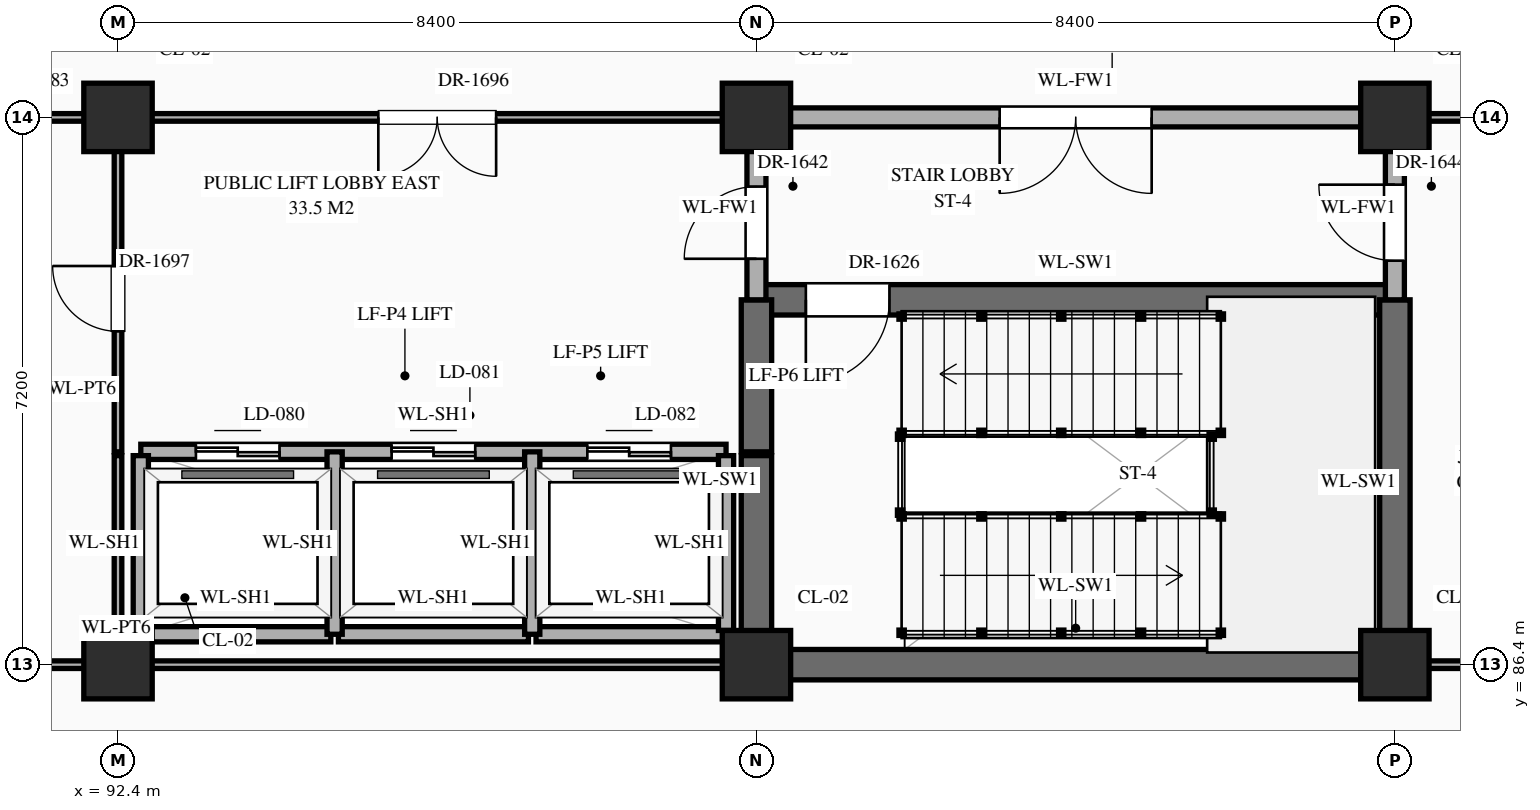
"""IFC4 building model, lengths in metres.
Left out: names, types, materials, properties, quantities, classifications, styles, units other than length and angle.
Written with IfcOpenShell. Run it as: python <this file> out.ifc"""

import sys

from ifc_helpers import new_model, si_unit, direction, frame, frame_2d, origin, origin_2d, place, context, subcontext, project, spatial, rectangle, extrude, element, fill, save


model = new_model("IFC4")
c1 = context("Model", 3, precision=1e-05, world=origin(), true_north=direction((0.0, 1.0)))
c2 = subcontext(c1, "Body", "Model", "MODEL_VIEW")
j1 = project(units=[si_unit("LENGTHUNIT", "METRE"), si_unit("PLANEANGLEUNIT", "RADIAN")], contexts=[c1])
p1 = place(None, origin())
s1 = spatial("IfcSite", under=j1, at=p1, CompositionType="ELEMENT")
p2 = place(p1, origin())
s2 = spatial("IfcBuilding", under=s1, at=p2, CompositionType="ELEMENT")
p3 = place(p2, frame((0.0, 0.0, 16.2)))
s3 = spatial("IfcBuildingStorey", under=s2, at=p3, CompositionType="ELEMENT", Elevation=16.2)
for number, where, z_axis, x_axis in (
    (1, (92.4, 86.4, 0.0), (0.0, 0.0, 1.0), (1.0, 0.0, 0.0)),
    (2, (92.4, 93.6, 0.0), (0.0, 0.0, 1.0), (1.0, 0.0, 0.0)),
    (3, (100.8, 86.4, 0.0), (0.0, 0.0, 1.0), (1.0, 0.0, 0.0)),
    (4, (100.8, 93.6, 0.0), (0.0, 0.0, 1.0), (1.0, 0.0, 0.0)),
    (5, (109.2, 86.4, 0.0), (0.0, 0.0, 1.0), (1.0, 0.0, 0.0)),
    (6, (109.2, 93.6, 0.0), (0.0, 0.0, 1.0), (1.0, 0.0, 0.0)),
):
    element("IfcColumn", number, at=place(p3, frame(where, z_axis=z_axis, x_axis=x_axis)), inside=s3, PredefinedType="COLUMN", context=c2, shape_type="SweptSolid", body=[
        extrude(rectangle(XDim=0.9, YDim=0.9, at=origin_2d()), origin(), (0.0, 0.0, 1.0), 5.4),
    ])
p4 = place(p3, frame((84.0, 86.4, 0.0), z_axis=(0.0, 0.0, 1.0), x_axis=(1.0, 0.0, 0.0)))
e7 = element("IfcWall", 7, at=p4, inside=s3, PredefinedType="STANDARD", context=c2, shape_type="SweptSolid", body=[
    extrude(rectangle(XDim=8.4, YDim=0.1, at=frame_2d((4.2, 0.0))), origin(), (0.0, 0.0, 1.0), 4.27),
])
p5 = place(p4, frame((1.065, 0.0, 0.0)))
e8 = element("IfcOpeningElement", 8, at=p5, cuts=e7, PredefinedType="OPENING", context=c2, shape_type="SweptSolid", body=[
    extrude(rectangle(XDim=1.04, YDim=2.2, at=frame_2d((0.52, 1.1))), frame((0.0, 0.062, 0.0), z_axis=(0.0, -1.0, 0.0), x_axis=(1.0, 0.0, 0.0)), (0.0, 0.0, 1.0), 0.124),
])
p6 = place(p4, frame((3.64, 0.0, 0.0)))
e9 = element("IfcOpeningElement", 9, at=p6, cuts=e7, PredefinedType="OPENING", context=c2, shape_type="SweptSolid", body=[
    extrude(rectangle(XDim=1.12, YDim=2.25, at=frame_2d((0.56, 1.125))), frame((0.0, 0.062, 0.0), z_axis=(0.0, -1.0, 0.0), x_axis=(1.0, 0.0, 0.0)), (0.0, 0.0, 1.0), 0.124),
])
p7 = place(p4, frame((6.235, 0.0, 0.0)))
e10 = element("IfcOpeningElement", 10, at=p7, cuts=e7, PredefinedType="OPENING", context=c2, shape_type="SweptSolid", body=[
    extrude(rectangle(XDim=1.16, YDim=2.3, at=frame_2d((0.58, 1.15))), frame((0.0, 0.062, 0.0), z_axis=(0.0, -1.0, 0.0), x_axis=(1.0, 0.0, 0.0)), (0.0, 0.0, 1.0), 0.124),
])
p8 = place(p3, frame((92.45, 86.4, 0.0), z_axis=(0.0, 0.0, 1.0), x_axis=(1.0, 0.0, 0.0)))
e11 = element("IfcWall", 11, at=p8, inside=s3, PredefinedType="STANDARD", context=c2, shape_type="SweptSolid", body=[
    extrude(rectangle(XDim=8.3, YDim=0.1, at=frame_2d((4.15, 0.0))), origin(), (0.0, 0.0, 1.0), 4.27),
])
p9 = place(p3, frame((100.8, 86.4, 0.0), z_axis=(0.0, 0.0, 1.0), x_axis=(1.0, 0.0, 0.0)))
e12 = element("IfcWall", 12, at=p9, inside=s3, PredefinedType="SHEAR", context=c2, shape_type="SweptSolid", body=[
    extrude(rectangle(XDim=8.4, YDim=0.4, at=frame_2d((4.2, 0.0))), origin(), (0.0, 0.0, 1.0), 5.12),
])
p10 = place(p3, frame((109.2, 86.4, 0.0), z_axis=(0.0, 0.0, 1.0), x_axis=(1.0, 0.0, 0.0)))
e13 = element("IfcWall", 13, at=p10, inside=s3, PredefinedType="STANDARD", context=c2, shape_type="SweptSolid", body=[
    extrude(rectangle(XDim=8.4, YDim=0.1, at=frame_2d((4.2, 0.0))), origin(), (0.0, 0.0, 1.0), 4.27),
])
p11 = place(p10, frame((0.965, 0.0, 0.0)))
e14 = element("IfcOpeningElement", 14, at=p11, cuts=e13, PredefinedType="OPENING", context=c2, shape_type="SweptSolid", body=[
    extrude(rectangle(XDim=1.24, YDim=2.3, at=frame_2d((0.62, 1.15))), frame((0.0, 0.062, 0.0), z_axis=(0.0, -1.0, 0.0), x_axis=(1.0, 0.0, 0.0)), (0.0, 0.0, 1.0), 0.124),
])
p12 = place(p10, frame((3.73, 0.0, 0.0)))
e15 = element("IfcOpeningElement", 15, at=p12, cuts=e13, PredefinedType="OPENING", context=c2, shape_type="SweptSolid", body=[
    extrude(rectangle(XDim=0.94, YDim=2.3, at=frame_2d((0.47, 1.15))), frame((0.0, 0.062, 0.0), z_axis=(0.0, -1.0, 0.0), x_axis=(1.0, 0.0, 0.0)), (0.0, 0.0, 1.0), 0.124),
])
p13 = place(p10, frame((6.325, 0.0, 0.0)))
e16 = element("IfcOpeningElement", 16, at=p13, cuts=e13, PredefinedType="OPENING", context=c2, shape_type="SweptSolid", body=[
    extrude(rectangle(XDim=0.98, YDim=2.35, at=frame_2d((0.49, 1.175))), frame((0.0, 0.062, 0.0), z_axis=(0.0, -1.0, 0.0), x_axis=(1.0, 0.0, 0.0)), (0.0, 0.0, 1.0), 0.124),
])
for number, where, z_axis, x_axis in (
    (17, (92.7, 86.8, 0.0), (0.0, 0.0, 1.0), (1.0, 0.0, 0.0)),
    (18, (95.3, 86.8, 0.0), (0.0, 0.0, 1.0), (1.0, 0.0, 0.0)),
    (19, (97.9, 86.8, 0.0), (0.0, 0.0, 1.0), (1.0, 0.0, 0.0)),
):
    element("IfcWall", number, at=place(p3, frame(where, z_axis=z_axis, x_axis=x_axis)), inside=s3, PredefinedType="STANDARD", context=c2, shape_type="SweptSolid", body=[
        extrude(rectangle(XDim=2.5, YDim=0.2, at=frame_2d((1.25, 0.0))), origin(), (0.0, 0.0, 1.0), 5.12),
    ])
p14 = place(p3, frame((92.7, 89.2, 0.0), z_axis=(0.0, 0.0, 1.0), x_axis=(1.0, 0.0, 0.0)))
e20 = element("IfcWall", 20, at=p14, inside=s3, PredefinedType="STANDARD", context=c2, shape_type="SweptSolid", body=[
    extrude(rectangle(XDim=7.7, YDim=0.2, at=frame_2d((3.85, 0.0))), origin(), (0.0, 0.0, 1.0), 5.12),
])
p15 = place(p14, frame((0.725, 0.0, 0.0)))
e21 = element("IfcOpeningElement", 21, at=p15, cuts=e20, PredefinedType="OPENING", context=c2, shape_type="SweptSolid", body=[
    extrude(rectangle(XDim=1.1, YDim=2.15, at=frame_2d((0.55, 1.075))), frame((0.0, 0.112, 0.0), z_axis=(0.0, -1.0, 0.0), x_axis=(1.0, 0.0, 0.0)), (0.0, 0.0, 1.0), 0.224),
])
p16 = place(p14, frame((3.3, 0.0, 0.0)))
e22 = element("IfcOpeningElement", 22, at=p16, cuts=e20, PredefinedType="OPENING", context=c2, shape_type="SweptSolid", body=[
    extrude(rectangle(XDim=1.1, YDim=2.15, at=frame_2d((0.55, 1.075))), frame((0.0, 0.112, 0.0), z_axis=(0.0, -1.0, 0.0), x_axis=(1.0, 0.0, 0.0)), (0.0, 0.0, 1.0), 0.224),
])
p17 = place(p14, frame((5.875, 0.0, 0.0)))
e23 = element("IfcOpeningElement", 23, at=p17, cuts=e20, PredefinedType="OPENING", context=c2, shape_type="SweptSolid", body=[
    extrude(rectangle(XDim=1.1, YDim=2.15, at=frame_2d((0.55, 1.075))), frame((0.0, 0.112, 0.0), z_axis=(0.0, -1.0, 0.0), x_axis=(1.0, 0.0, 0.0)), (0.0, 0.0, 1.0), 0.224),
])
p18 = place(p3, frame((100.8, 91.2, 0.0), z_axis=(0.0, 0.0, 1.0), x_axis=(1.0, 0.0, 0.0)))
e24 = element("IfcWall", 24, at=p18, inside=s3, PredefinedType="SHEAR", context=c2, shape_type="SweptSolid", body=[
    extrude(rectangle(XDim=8.4, YDim=0.4, at=frame_2d((4.2, 0.0))), origin(), (0.0, 0.0, 1.0), 5.12),
])
p19 = place(p18, frame((0.65, 0.0, 0.0)))
e25 = element("IfcOpeningElement", 25, at=p19, cuts=e24, PredefinedType="OPENING", context=c2, shape_type="SweptSolid", body=[
    extrude(rectangle(XDim=1.1, YDim=2.2, at=frame_2d((0.55, 1.1))), frame((0.0, 0.212, 0.0), z_axis=(0.0, -1.0, 0.0), x_axis=(1.0, 0.0, 0.0)), (0.0, 0.0, 1.0), 0.424),
])
p20 = place(p3, frame((67.2, 93.6, 0.0), z_axis=(0.0, 0.0, 1.0), x_axis=(1.0, 0.0, 0.0)))
e26 = element("IfcWall", 26, at=p20, inside=s3, PredefinedType="STANDARD", context=c2, shape_type="SweptSolid", body=[
    extrude(rectangle(XDim=33.6, YDim=0.1, at=frame_2d((16.8, 0.0))), origin(), (0.0, 0.0, 1.0), 4.27),
])
p21 = place(p20, frame((3.375, 0.0, 0.0)))
e27 = element("IfcOpeningElement", 27, at=p21, cuts=e26, PredefinedType="OPENING", context=c2, shape_type="SweptSolid", body=[
    extrude(rectangle(XDim=1.65, YDim=2.4, at=frame_2d((0.825, 1.2))), frame((0.0, 0.062, 0.0), z_axis=(0.0, -1.0, 0.0), x_axis=(1.0, 0.0, 0.0)), (0.0, 0.0, 1.0), 0.124),
])
p22 = place(p20, frame((28.625, 0.0, 0.0)))
e28 = element("IfcOpeningElement", 28, at=p22, cuts=e26, PredefinedType="OPENING", context=c2, shape_type="SweptSolid", body=[
    extrude(rectangle(XDim=1.55, YDim=2.35, at=frame_2d((0.775, 1.175))), frame((0.0, 0.062, 0.0), z_axis=(0.0, -1.0, 0.0), x_axis=(1.0, 0.0, 0.0)), (0.0, 0.0, 1.0), 0.124),
])
p23 = place(p20, frame((11.65, 0.0, 0.0)))
e29 = element("IfcOpeningElement", 29, at=p23, cuts=e26, PredefinedType="OPENING", context=c2, shape_type="SweptSolid", body=[
    extrude(rectangle(XDim=1.9, YDim=2.5, at=frame_2d((0.95, 1.25))), frame((0.0, 0.062, 0.0), z_axis=(0.0, -1.0, 0.0), x_axis=(1.0, 0.0, 0.0)), (0.0, 0.0, 1.0), 0.124),
])
p24 = place(p20, frame((17.935, 0.0, 0.0)))
e30 = element("IfcOpeningElement", 30, at=p24, cuts=e26, PredefinedType="OPENING", context=c2, shape_type="SweptSolid", body=[
    extrude(rectangle(XDim=0.9, YDim=2.15, at=frame_2d((0.45, 1.075))), frame((0.0, 0.062, 0.0), z_axis=(0.0, -1.0, 0.0), x_axis=(1.0, 0.0, 0.0)), (0.0, 0.0, 1.0), 0.124),
])
p25 = place(p20, frame((20.57, 0.0, 0.0)))
e31 = element("IfcOpeningElement", 31, at=p25, cuts=e26, PredefinedType="OPENING", context=c2, shape_type="SweptSolid", body=[
    extrude(rectangle(XDim=0.86, YDim=2.1, at=frame_2d((0.43, 1.05))), frame((0.0, 0.062, 0.0), z_axis=(0.0, -1.0, 0.0), x_axis=(1.0, 0.0, 0.0)), (0.0, 0.0, 1.0), 0.124),
])
p26 = place(p20, frame((23.155, 0.0, 0.0)))
e32 = element("IfcOpeningElement", 32, at=p26, cuts=e26, PredefinedType="OPENING", context=c2, shape_type="SweptSolid", body=[
    extrude(rectangle(XDim=0.92, YDim=2.15, at=frame_2d((0.46, 1.075))), frame((0.0, 0.062, 0.0), z_axis=(0.0, -1.0, 0.0), x_axis=(1.0, 0.0, 0.0)), (0.0, 0.0, 1.0), 0.124),
])
p27 = place(p3, frame((100.8, 93.6, 0.0), z_axis=(0.0, 0.0, 1.0), x_axis=(1.0, 0.0, 0.0)))
e33 = element("IfcWall", 33, at=p27, inside=s3, PredefinedType="STANDARD", context=c2, shape_type="SweptSolid", body=[
    extrude(rectangle(XDim=8.4, YDim=0.25, at=frame_2d((4.2, 0.0))), origin(), (0.0, 0.0, 1.0), 4.27),
])
p28 = place(p27, frame((3.2, 0.0, 0.0)))
e34 = element("IfcOpeningElement", 34, at=p28, cuts=e33, PredefinedType="OPENING", context=c2, shape_type="SweptSolid", body=[
    extrude(rectangle(XDim=2.0, YDim=2.4, at=frame_2d((1.0, 1.2))), frame((0.0, 0.137, 0.0), z_axis=(0.0, -1.0, 0.0), x_axis=(1.0, 0.0, 0.0)), (0.0, 0.0, 1.0), 0.274),
])
p29 = place(p3, frame((109.2, 93.6, 0.0), z_axis=(0.0, 0.0, 1.0), x_axis=(1.0, 0.0, 0.0)))
e35 = element("IfcWall", 35, at=p29, inside=s3, PredefinedType="STANDARD", context=c2, shape_type="SweptSolid", body=[
    extrude(rectangle(XDim=8.4, YDim=0.1, at=frame_2d((4.2, 0.0))), origin(), (0.0, 0.0, 1.0), 4.27),
])
p30 = place(p29, frame((1.105, 0.0, 0.0)))
e36 = element("IfcOpeningElement", 36, at=p30, cuts=e35, PredefinedType="OPENING", context=c2, shape_type="SweptSolid", body=[
    extrude(rectangle(XDim=0.96, YDim=2.2, at=frame_2d((0.48, 1.1))), frame((0.0, 0.062, 0.0), z_axis=(0.0, -1.0, 0.0), x_axis=(1.0, 0.0, 0.0)), (0.0, 0.0, 1.0), 0.124),
])
p31 = place(p29, frame((3.7, 0.0, 0.0)))
e37 = element("IfcOpeningElement", 37, at=p31, cuts=e35, PredefinedType="OPENING", context=c2, shape_type="SweptSolid", body=[
    extrude(rectangle(XDim=1.0, YDim=2.25, at=frame_2d((0.5, 1.125))), frame((0.0, 0.062, 0.0), z_axis=(0.0, -1.0, 0.0), x_axis=(1.0, 0.0, 0.0)), (0.0, 0.0, 1.0), 0.124),
])
p32 = place(p29, frame((6.295, 0.0, 0.0)))
e38 = element("IfcOpeningElement", 38, at=p32, cuts=e35, PredefinedType="OPENING", context=c2, shape_type="SweptSolid", body=[
    extrude(rectangle(XDim=1.04, YDim=2.2, at=frame_2d((0.52, 1.1))), frame((0.0, 0.062, 0.0), z_axis=(0.0, -1.0, 0.0), x_axis=(1.0, 0.0, 0.0)), (0.0, 0.0, 1.0), 0.124),
])
p33 = place(p3, frame((92.4, 86.45, 0.0), z_axis=(0.0, 0.0, 1.0), x_axis=(0.0, 1.0, 0.0)))
e39 = element("IfcWall", 39, at=p33, inside=s3, PredefinedType="STANDARD", context=c2, shape_type="SweptSolid", body=[
    extrude(rectangle(XDim=2.7, YDim=0.1, at=frame_2d((1.35, 0.0))), origin(), (0.0, 0.0, 1.0), 4.37),
])
p34 = place(p3, frame((92.4, 89.2, 0.0), z_axis=(0.0, 0.0, 1.0), x_axis=(0.0, 1.0, 0.0)))
e40 = element("IfcWall", 40, at=p34, inside=s3, PredefinedType="STANDARD", context=c2, shape_type="SweptSolid", body=[
    extrude(rectangle(XDim=4.4, YDim=0.1, at=frame_2d((2.2, 0.0))), origin(), (0.0, 0.0, 1.0), 4.37),
])
p35 = place(p34, frame((1.585, 0.0, 0.0)))
e41 = element("IfcOpeningElement", 41, at=p35, cuts=e40, PredefinedType="OPENING", context=c2, shape_type="SweptSolid", body=[
    extrude(rectangle(XDim=0.86, YDim=2.1, at=frame_2d((0.43, 1.05))), frame((0.0, 0.062, 0.0), z_axis=(0.0, -1.0, 0.0), x_axis=(1.0, 0.0, 0.0)), (0.0, 0.0, 1.0), 0.124),
])
p36 = place(p3, frame((92.7, 86.85, 0.0), z_axis=(0.0, 0.0, 1.0), x_axis=(0.0, 1.0, 0.0)))
e42 = element("IfcWall", 42, at=p36, inside=s3, PredefinedType="STANDARD", context=c2, shape_type="SweptSolid", body=[
    extrude(rectangle(XDim=2.3, YDim=0.2, at=frame_2d((1.15, 0.0))), origin(), (0.0, 0.0, 1.0), 5.12),
])
for number, where, z_axis, x_axis in (
    (43, (95.25, 86.8, 0.0), (0.0, 0.0, 1.0), (0.0, 1.0, 0.0)),
    (44, (97.85, 86.8, 0.0), (0.0, 0.0, 1.0), (0.0, 1.0, 0.0)),
):
    element("IfcWall", number, at=place(p3, frame(where, z_axis=z_axis, x_axis=x_axis)), inside=s3, PredefinedType="STANDARD", context=c2, shape_type="SweptSolid", body=[
        extrude(rectangle(XDim=2.4, YDim=0.2, at=frame_2d((1.2, 0.0))), origin(), (0.0, 0.0, 1.0), 5.12),
    ])
p37 = place(p3, frame((100.4, 86.85, 0.0), z_axis=(0.0, 0.0, 1.0), x_axis=(0.0, 1.0, 0.0)))
e45 = element("IfcWall", 45, at=p37, inside=s3, PredefinedType="STANDARD", context=c2, shape_type="SweptSolid", body=[
    extrude(rectangle(XDim=2.3, YDim=0.2, at=frame_2d((1.15, 0.0))), origin(), (0.0, 0.0, 1.0), 5.12),
])
p38 = place(p3, frame((100.8, 86.45, 0.0), z_axis=(0.0, 0.0, 1.0), x_axis=(0.0, 1.0, 0.0)))
e46 = element("IfcWall", 46, at=p38, inside=s3, PredefinedType="SHEAR", context=c2, shape_type="SweptSolid", body=[
    extrude(rectangle(XDim=2.7, YDim=0.4, at=frame_2d((1.35, 0.0))), origin(), (0.0, 0.0, 1.0), 5.12),
])
p39 = place(p3, frame((100.8, 89.2, 0.0), z_axis=(0.0, 0.0, 1.0), x_axis=(0.0, 1.0, 0.0)))
e47 = element("IfcWall", 47, at=p39, inside=s3, PredefinedType="SHEAR", context=c2, shape_type="SweptSolid", body=[
    extrude(rectangle(XDim=2.0, YDim=0.4, at=frame_2d((1.0, 0.0))), origin(), (0.0, 0.0, 1.0), 5.12),
])
p40 = place(p3, frame((100.8, 91.2, 0.0), z_axis=(0.0, 0.0, 1.0), x_axis=(0.0, 1.0, 0.0)))
e48 = element("IfcWall", 48, at=p40, inside=s3, PredefinedType="STANDARD", context=c2, shape_type="SweptSolid", body=[
    extrude(rectangle(XDim=2.4, YDim=0.25, at=frame_2d((1.2, 0.0))), origin(), (0.0, 0.0, 1.0), 4.37),
])
p41 = place(p40, frame((0.54, 0.0, 0.0)))
e49 = element("IfcOpeningElement", 49, at=p41, cuts=e48, PredefinedType="OPENING", context=c2, shape_type="SweptSolid", body=[
    extrude(rectangle(XDim=0.95, YDim=2.15, at=frame_2d((0.475, 1.075))), frame((0.0, 0.137, 0.0), z_axis=(0.0, -1.0, 0.0), x_axis=(1.0, 0.0, 0.0)), (0.0, 0.0, 1.0), 0.274),
])
p42 = place(p3, frame((109.2, 86.4, 0.0), z_axis=(0.0, 0.0, 1.0), x_axis=(0.0, 1.0, 0.0)))
e50 = element("IfcWall", 50, at=p42, inside=s3, PredefinedType="SHEAR", context=c2, shape_type="SweptSolid", body=[
    extrude(rectangle(XDim=4.8, YDim=0.4, at=frame_2d((2.4, 0.0))), origin(), (0.0, 0.0, 1.0), 5.12),
])
p43 = place(p3, frame((109.2, 91.2, 0.0), z_axis=(0.0, 0.0, 1.0), x_axis=(0.0, 1.0, 0.0)))
e51 = element("IfcWall", 51, at=p43, inside=s3, PredefinedType="STANDARD", context=c2, shape_type="SweptSolid", body=[
    extrude(rectangle(XDim=2.4, YDim=0.25, at=frame_2d((1.2, 0.0))), origin(), (0.0, 0.0, 1.0), 4.37),
])
p44 = place(p43, frame((0.515, 0.0, 0.0)))
e52 = element("IfcOpeningElement", 52, at=p44, cuts=e51, PredefinedType="OPENING", context=c2, shape_type="SweptSolid", body=[
    extrude(rectangle(XDim=1.0, YDim=2.2, at=frame_2d((0.5, 1.1))), frame((0.0, 0.137, 0.0), z_axis=(0.0, -1.0, 0.0), x_axis=(1.0, 0.0, 0.0)), (0.0, 0.0, 1.0), 0.274),
])
p45 = place(p15, origin())
e53 = element("IfcDoor", 53, at=p45, inside=s3, OperationType="DOUBLE_DOOR_SLIDING", PredefinedType="DOOR", context=c2, shape_type="SweptSolid", body=[
    extrude(rectangle(XDim=1.1, YDim=2.15, at=frame_2d((0.55, 1.075))), frame((0.0, 0.025, 0.0), z_axis=(0.0, -1.0, 0.0), x_axis=(1.0, 0.0, 0.0)), (0.0, 0.0, 1.0), 0.05),
])
fill(e21, e53)
p46 = place(p16, origin())
e54 = element("IfcDoor", 54, at=p46, inside=s3, OperationType="DOUBLE_DOOR_SLIDING", PredefinedType="DOOR", context=c2, shape_type="SweptSolid", body=[
    extrude(rectangle(XDim=1.1, YDim=2.15, at=frame_2d((0.55, 1.075))), frame((0.0, 0.025, 0.0), z_axis=(0.0, -1.0, 0.0), x_axis=(1.0, 0.0, 0.0)), (0.0, 0.0, 1.0), 0.05),
])
fill(e22, e54)
p47 = place(p17, origin())
e55 = element("IfcDoor", 55, at=p47, inside=s3, OperationType="DOUBLE_DOOR_SLIDING", PredefinedType="DOOR", context=c2, shape_type="SweptSolid", body=[
    extrude(rectangle(XDim=1.1, YDim=2.15, at=frame_2d((0.55, 1.075))), frame((0.0, 0.025, 0.0), z_axis=(0.0, -1.0, 0.0), x_axis=(1.0, 0.0, 0.0)), (0.0, 0.0, 1.0), 0.05),
])
fill(e23, e55)
p48 = place(p19, frame((1.1, 0.0, 0.0), z_axis=(0.0, 0.0, 1.0), x_axis=(-1.0, 0.0, 0.0)))
e56 = element("IfcDoor", 56, at=p48, inside=s3, OperationType="SINGLE_SWING_RIGHT", PredefinedType="DOOR", context=c2, shape_type="SweptSolid", body=[
    extrude(rectangle(XDim=1.1, YDim=2.2, at=frame_2d((0.55, 1.1))), frame((0.0, 0.025, 0.0), z_axis=(0.0, -1.0, 0.0), x_axis=(1.0, 0.0, 0.0)), (0.0, 0.0, 1.0), 0.05),
])
fill(e25, e56)
p49 = place(p41, origin())
e57 = element("IfcDoor", 57, at=p49, inside=s3, OperationType="SINGLE_SWING_LEFT", PredefinedType="DOOR", context=c2, shape_type="SweptSolid", body=[
    extrude(rectangle(XDim=0.95, YDim=2.15, at=frame_2d((0.475, 1.075))), frame((0.0, 0.025, 0.0), z_axis=(0.0, -1.0, 0.0), x_axis=(1.0, 0.0, 0.0)), (0.0, 0.0, 1.0), 0.05),
])
fill(e49, e57)
p50 = place(p28, frame((2.0, 0.0, 0.0), z_axis=(0.0, 0.0, 1.0), x_axis=(-1.0, 0.0, 0.0)))
e58 = element("IfcDoor", 58, at=p50, inside=s3, OperationType="DOUBLE_DOOR_SINGLE_SWING", PredefinedType="DOOR", context=c2, shape_type="SweptSolid", body=[
    extrude(rectangle(XDim=2.0, YDim=2.4, at=frame_2d((1.0, 1.2))), frame((0.0, 0.025, 0.0), z_axis=(0.0, -1.0, 0.0), x_axis=(1.0, 0.0, 0.0)), (0.0, 0.0, 1.0), 0.05),
])
fill(e34, e58)
p51 = place(p44, origin())
e59 = element("IfcDoor", 59, at=p51, inside=s3, OperationType="SINGLE_SWING_RIGHT", PredefinedType="DOOR", context=c2, shape_type="SweptSolid", body=[
    extrude(rectangle(XDim=1.0, YDim=2.2, at=frame_2d((0.5, 1.1))), frame((0.0, 0.025, 0.0), z_axis=(0.0, -1.0, 0.0), x_axis=(1.0, 0.0, 0.0)), (0.0, 0.0, 1.0), 0.05),
])
fill(e52, e59)
p52 = place(p22, frame((1.55, 0.0, 0.0), z_axis=(0.0, 0.0, 1.0), x_axis=(-1.0, 0.0, 0.0)))
e60 = element("IfcDoor", 60, at=p52, inside=s3, OperationType="DOUBLE_DOOR_SINGLE_SWING", PredefinedType="DOOR", context=c2, shape_type="SweptSolid", body=[
    extrude(rectangle(XDim=1.55, YDim=2.35, at=frame_2d((0.775, 1.175))), frame((0.0, 0.025, 0.0), z_axis=(0.0, -1.0, 0.0), x_axis=(1.0, 0.0, 0.0)), (0.0, 0.0, 1.0), 0.05),
])
fill(e28, e60)
p53 = place(p35, origin())
e61 = element("IfcDoor", 61, at=p53, inside=s3, OperationType="SINGLE_SWING_RIGHT", PredefinedType="DOOR", context=c2, shape_type="SweptSolid", body=[
    extrude(rectangle(XDim=0.86, YDim=2.1, at=frame_2d((0.43, 1.05))), frame((0.0, 0.025, 0.0), z_axis=(0.0, -1.0, 0.0), x_axis=(1.0, 0.0, 0.0)), (0.0, 0.0, 1.0), 0.05),
])
fill(e41, e61)
save(model, sys.argv[1])
